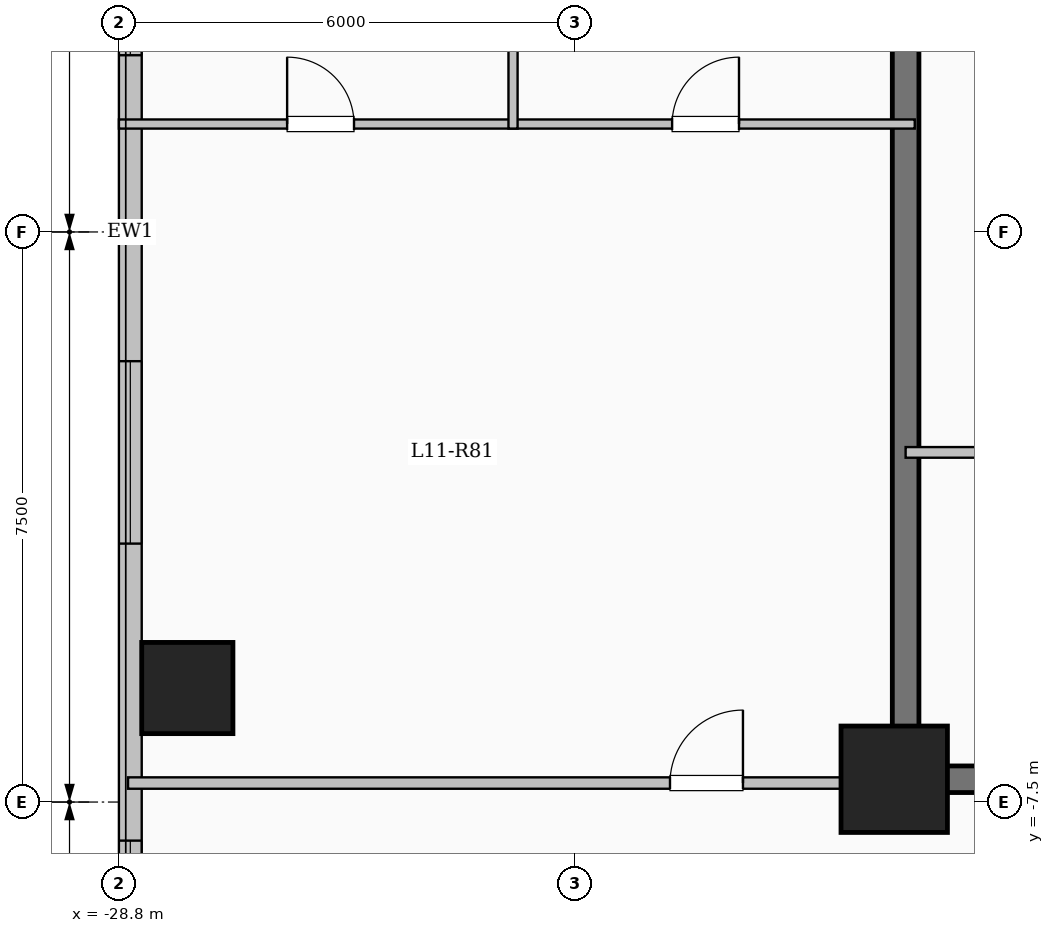
"""IFC4 building model, lengths in metres.
Left out: names, types, materials, properties, quantities, classifications, styles, units other than length and angle.
Written with IfcOpenShell. Run it as: python <this file> out.ifc"""

import sys

from ifc_helpers import new_model, si_unit, direction, frame, frame_2d, origin, origin_2d, place, context, subcontext, project, spatial, rectangle, extrude, element, fill, save


model = new_model("IFC4")
c1 = context("Model", 3, precision=1e-05, world=origin(), true_north=direction((0.0, 1.0)))
c2 = subcontext(c1, "Body", "Model", "MODEL_VIEW")
j1 = project(units=[si_unit("LENGTHUNIT", "METRE"), si_unit("PLANEANGLEUNIT", "RADIAN")], contexts=[c1])
p1 = place(None, origin())
s1 = spatial("IfcSite", under=j1, at=p1, CompositionType="ELEMENT")
p2 = place(p1, origin())
s2 = spatial("IfcBuilding", under=s1, at=p2, CompositionType="ELEMENT")
p3 = place(p2, frame((0.0, 0.0, 44.1)))
s3 = spatial("IfcBuildingStorey", under=s2, at=p3, CompositionType="ELEMENT", Elevation=44.1)
p4 = place(p3, frame((-18.6, -7.2, 0.0), z_axis=(0.0, 0.0, 1.0), x_axis=(1.0, 0.0, 0.0)))
e1 = element("IfcColumn", 1, at=p4, inside=s3, PredefinedType="COLUMN", context=c2, shape_type="SweptSolid", body=[
    extrude(rectangle(XDim=1.4, YDim=1.4, at=origin_2d()), origin(), (0.0, 0.0, 1.0), 3.35),
])
p5 = place(p3, frame((-27.9, -6.0, 0.0), z_axis=(0.0, 0.0, 1.0), x_axis=(1.0, 0.0, 0.0)))
e2 = element("IfcColumn", 2, at=p5, inside=s3, PredefinedType="COLUMN", context=c2, shape_type="SweptSolid", body=[
    extrude(rectangle(XDim=1.2, YDim=1.2, at=origin_2d()), origin(), (0.0, 0.0, 1.0), 3.35),
])
p6 = place(p3, frame((-28.65, -19.05, 0.0), z_axis=(0.0, 0.0, 1.0), x_axis=(0.0, 1.0, 0.0)))
e3 = element("IfcWall", 3, at=p6, inside=s3, PredefinedType="SOLIDWALL", context=c2, shape_type="SweptSolid", body=[
    extrude(rectangle(XDim=38.1, YDim=0.3, at=frame_2d((19.05, 0.0))), origin(), (0.0, 0.0, 1.0), 3.1),
])
p7 = place(p6, frame((3.15, 0.0, 0.9)))
e4 = element("IfcOpeningElement", 4, at=p7, cuts=e3, PredefinedType="OPENING", context=c2, shape_type="SweptSolid", body=[
    extrude(rectangle(XDim=2.4, YDim=1.8, at=frame_2d((1.2, 0.9))), frame((0.0, 0.16, 0.0), z_axis=(0.0, -1.0, 0.0), x_axis=(1.0, 0.0, 0.0)), (0.0, 0.0, 1.0), 0.32),
])
p8 = place(p6, frame((9.542, 0.0, 0.9)))
e5 = element("IfcOpeningElement", 5, at=p8, cuts=e3, PredefinedType="OPENING", context=c2, shape_type="SweptSolid", body=[
    extrude(rectangle(XDim=1.5, YDim=1.65, at=frame_2d((0.75, 0.825))), frame((0.0, 0.16, 0.0), z_axis=(0.0, -1.0, 0.0), x_axis=(1.0, 0.0, 0.0)), (0.0, 0.0, 1.0), 0.32),
])
p9 = place(p6, frame((14.95, 0.0, 0.9)))
e6 = element("IfcOpeningElement", 6, at=p9, cuts=e3, PredefinedType="OPENING", context=c2, shape_type="SweptSolid", body=[
    extrude(rectangle(XDim=2.4, YDim=1.8, at=frame_2d((1.2, 0.9))), frame((0.0, 0.16, 0.0), z_axis=(0.0, -1.0, 0.0), x_axis=(1.0, 0.0, 0.0)), (0.0, 0.0, 1.0), 0.32),
])
p10 = place(p6, frame((21.375, 0.0, 0.9)))
e7 = element("IfcOpeningElement", 7, at=p10, cuts=e3, PredefinedType="OPENING", context=c2, shape_type="SweptSolid", body=[
    extrude(rectangle(XDim=1.8, YDim=1.65, at=frame_2d((0.9, 0.825))), frame((0.0, 0.16, 0.0), z_axis=(0.0, -1.0, 0.0), x_axis=(1.0, 0.0, 0.0)), (0.0, 0.0, 1.0), 0.32),
])
p11 = place(p6, frame((25.925, 0.0, 0.9)))
e8 = element("IfcOpeningElement", 8, at=p11, cuts=e3, PredefinedType="OPENING", context=c2, shape_type="SweptSolid", body=[
    extrude(rectangle(XDim=2.0, YDim=1.7, at=frame_2d((1.0, 0.85))), frame((0.0, 0.16, 0.0), z_axis=(0.0, -1.0, 0.0), x_axis=(1.0, 0.0, 0.0)), (0.0, 0.0, 1.0), 0.32),
])
p12 = place(p6, frame((30.175, 0.0, 0.95)))
e9 = element("IfcOpeningElement", 9, at=p12, cuts=e3, PredefinedType="OPENING", context=c2, shape_type="SweptSolid", body=[
    extrude(rectangle(XDim=1.0, YDim=1.5, at=frame_2d((0.5, 0.75))), frame((0.0, 0.16, 0.0), z_axis=(0.0, -1.0, 0.0), x_axis=(1.0, 0.0, 0.0)), (0.0, 0.0, 1.0), 0.32),
])
p13 = place(p6, frame((33.85, 0.0, 0.9)))
e10 = element("IfcOpeningElement", 10, at=p13, cuts=e3, PredefinedType="OPENING", context=c2, shape_type="SweptSolid", body=[
    extrude(rectangle(XDim=2.0, YDim=1.7, at=frame_2d((1.0, 0.85))), frame((0.0, 0.16, 0.0), z_axis=(0.0, -1.0, 0.0), x_axis=(1.0, 0.0, 0.0)), (0.0, 0.0, 1.0), 0.32),
])
p14 = place(p3, frame((-18.45, -7.375, 0.0), z_axis=(0.0, 0.0, 1.0), x_axis=(0.0, 1.0, 0.0)))
e11 = element("IfcWall", 11, at=p14, inside=s3, PredefinedType="SHEAR", context=c2, shape_type="SweptSolid", body=[
    extrude(rectangle(XDim=14.05, YDim=0.35, at=frame_2d((7.025, 0.0))), origin(), (0.0, 0.0, 1.0), 3.35),
])
p15 = place(p3, frame((-18.625, -7.2, 0.0), z_axis=(0.0, 0.0, 1.0), x_axis=(1.0, 0.0, 0.0)))
e12 = element("IfcWall", 12, at=p15, inside=s3, PredefinedType="SHEAR", context=c2, shape_type="SweptSolid", body=[
    extrude(rectangle(XDim=8.55, YDim=0.35, at=frame_2d((4.275, 0.0))), origin(), (0.0, 0.0, 1.0), 3.35),
])
p16 = place(p3, frame((-18.45, -2.9, 0.0), z_axis=(0.0, 0.0, 1.0), x_axis=(1.0, 0.0, 0.0)))
e13 = element("IfcWall", 13, at=p16, inside=s3, PredefinedType="PARTITIONING", context=c2, shape_type="SweptSolid", body=[
    extrude(rectangle(XDim=3.05, YDim=0.14, at=frame_2d((1.525, 0.0))), origin(), (0.0, 0.0, 1.0), 3.1),
])
p17 = place(p16, frame((1.05, 0.0, 0.0)))
e14 = element("IfcOpeningElement", 14, at=p17, cuts=e13, PredefinedType="OPENING", context=c2, shape_type="SweptSolid", body=[
    extrude(rectangle(XDim=0.9, YDim=2.08, at=frame_2d((0.45, 1.04))), frame((0.0, 0.08, 0.0), z_axis=(0.0, -1.0, 0.0), x_axis=(1.0, 0.0, 0.0)), (0.0, 0.0, 1.0), 0.16),
])
p18 = place(p3, frame((-28.68, -7.25, 0.0), z_axis=(0.0, 0.0, 1.0), x_axis=(1.0, 0.0, 0.0)))
e15 = element("IfcWall", 15, at=p18, inside=s3, PredefinedType="PARTITIONING", context=c2, shape_type="SweptSolid", body=[
    extrude(rectangle(XDim=10.23, YDim=0.15, at=frame_2d((5.115, 0.0))), origin(), (0.0, 0.0, 1.0), 3.1),
])
p19 = place(p18, frame((7.13, 0.0, 0.0)))
e16 = element("IfcOpeningElement", 16, at=p19, cuts=e15, PredefinedType="OPENING", context=c2, shape_type="SweptSolid", body=[
    extrude(rectangle(XDim=0.96, YDim=2.15, at=frame_2d((0.48, 1.075))), frame((0.0, 0.085, 0.0), z_axis=(0.0, -1.0, 0.0), x_axis=(1.0, 0.0, 0.0)), (0.0, 0.0, 1.0), 0.17),
])
p20 = place(p3, frame((-28.8, 1.42, 0.0), z_axis=(0.0, 0.0, 1.0), x_axis=(1.0, 0.0, 0.0)))
e17 = element("IfcWall", 17, at=p20, inside=s3, PredefinedType="PARTITIONING", context=c2, shape_type="SweptSolid", body=[
    extrude(rectangle(XDim=10.47, YDim=0.12, at=frame_2d((5.235, 0.0))), origin(), (0.0, 0.0, 1.0), 3.1),
])
p21 = place(p20, frame((2.213, 0.0, 0.0)))
e18 = element("IfcOpeningElement", 18, at=p21, cuts=e17, PredefinedType="OPENING", context=c2, shape_type="SweptSolid", body=[
    extrude(rectangle(XDim=0.88, YDim=2.1, at=frame_2d((0.44, 1.05))), frame((0.0, 0.07, 0.0), z_axis=(0.0, -1.0, 0.0), x_axis=(1.0, 0.0, 0.0)), (0.0, 0.0, 1.0), 0.14),
])
p22 = place(p20, frame((7.278, 0.0, 0.0)))
e19 = element("IfcOpeningElement", 19, at=p22, cuts=e17, PredefinedType="OPENING", context=c2, shape_type="SweptSolid", body=[
    extrude(rectangle(XDim=0.88, YDim=2.1, at=frame_2d((0.44, 1.05))), frame((0.0, 0.07, 0.0), z_axis=(0.0, -1.0, 0.0), x_axis=(1.0, 0.0, 0.0)), (0.0, 0.0, 1.0), 0.14),
])
p23 = place(p3, frame((-23.615, 1.36, 0.0), z_axis=(0.0, 0.0, 1.0), x_axis=(0.0, 1.0, 0.0)))
e20 = element("IfcWall", 20, at=p23, inside=s3, PredefinedType="PARTITIONING", context=c2, shape_type="SweptSolid", body=[
    extrude(rectangle(XDim=3.58, YDim=0.12, at=frame_2d((1.79, 0.0))), origin(), (0.0, 0.0, 1.0), 3.1),
])
p24 = place(p8, origin())
e21 = element("IfcWindow", 21, at=p24, inside=s3, PartitioningType="SINGLE_PANEL", PredefinedType="WINDOW", context=c2, shape_type="SweptSolid", body=[
    extrude(rectangle(XDim=1.5, YDim=1.65, at=frame_2d((0.75, 0.825))), frame((0.0, 0.03, 0.0), z_axis=(0.0, -1.0, 0.0), x_axis=(1.0, 0.0, 0.0)), (0.0, 0.0, 1.0), 0.06),
])
fill(e5, e21)
p25 = place(p9, origin())
e22 = element("IfcWindow", 22, at=p25, inside=s3, PartitioningType="SINGLE_PANEL", PredefinedType="WINDOW", context=c2, shape_type="SweptSolid", body=[
    extrude(rectangle(XDim=2.4, YDim=1.8, at=frame_2d((1.2, 0.9))), frame((0.0, 0.03, 0.0), z_axis=(0.0, -1.0, 0.0), x_axis=(1.0, 0.0, 0.0)), (0.0, 0.0, 1.0), 0.06),
])
fill(e6, e22)
p26 = place(p10, origin())
e23 = element("IfcWindow", 23, at=p26, inside=s3, PartitioningType="SINGLE_PANEL", PredefinedType="WINDOW", context=c2, shape_type="SweptSolid", body=[
    extrude(rectangle(XDim=1.8, YDim=1.65, at=frame_2d((0.9, 0.825))), frame((0.0, 0.03, 0.0), z_axis=(0.0, -1.0, 0.0), x_axis=(1.0, 0.0, 0.0)), (0.0, 0.0, 1.0), 0.06),
])
fill(e7, e23)
p27 = place(p19, origin())
e24 = element("IfcDoor", 24, at=p27, inside=s3, OperationType="SINGLE_SWING_RIGHT", PredefinedType="DOOR", context=c2, shape_type="SweptSolid", body=[
    extrude(rectangle(XDim=0.96, YDim=2.15, at=frame_2d((0.48, 1.075))), frame((0.0, 0.025, 0.0), z_axis=(0.0, -1.0, 0.0), x_axis=(1.0, 0.0, 0.0)), (0.0, 0.0, 1.0), 0.05),
])
fill(e16, e24)
p28 = place(p21, origin())
e25 = element("IfcDoor", 25, at=p28, inside=s3, OperationType="SINGLE_SWING_LEFT", PredefinedType="DOOR", context=c2, shape_type="SweptSolid", body=[
    extrude(rectangle(XDim=0.88, YDim=2.1, at=frame_2d((0.44, 1.05))), frame((0.0, 0.025, 0.0), z_axis=(0.0, -1.0, 0.0), x_axis=(1.0, 0.0, 0.0)), (0.0, 0.0, 1.0), 0.05),
])
fill(e18, e25)
p29 = place(p22, origin())
e26 = element("IfcDoor", 26, at=p29, inside=s3, OperationType="SINGLE_SWING_RIGHT", PredefinedType="DOOR", context=c2, shape_type="SweptSolid", body=[
    extrude(rectangle(XDim=0.88, YDim=2.1, at=frame_2d((0.44, 1.05))), frame((0.0, 0.025, 0.0), z_axis=(0.0, -1.0, 0.0), x_axis=(1.0, 0.0, 0.0)), (0.0, 0.0, 1.0), 0.05),
])
fill(e19, e26)
save(model, sys.argv[1])
